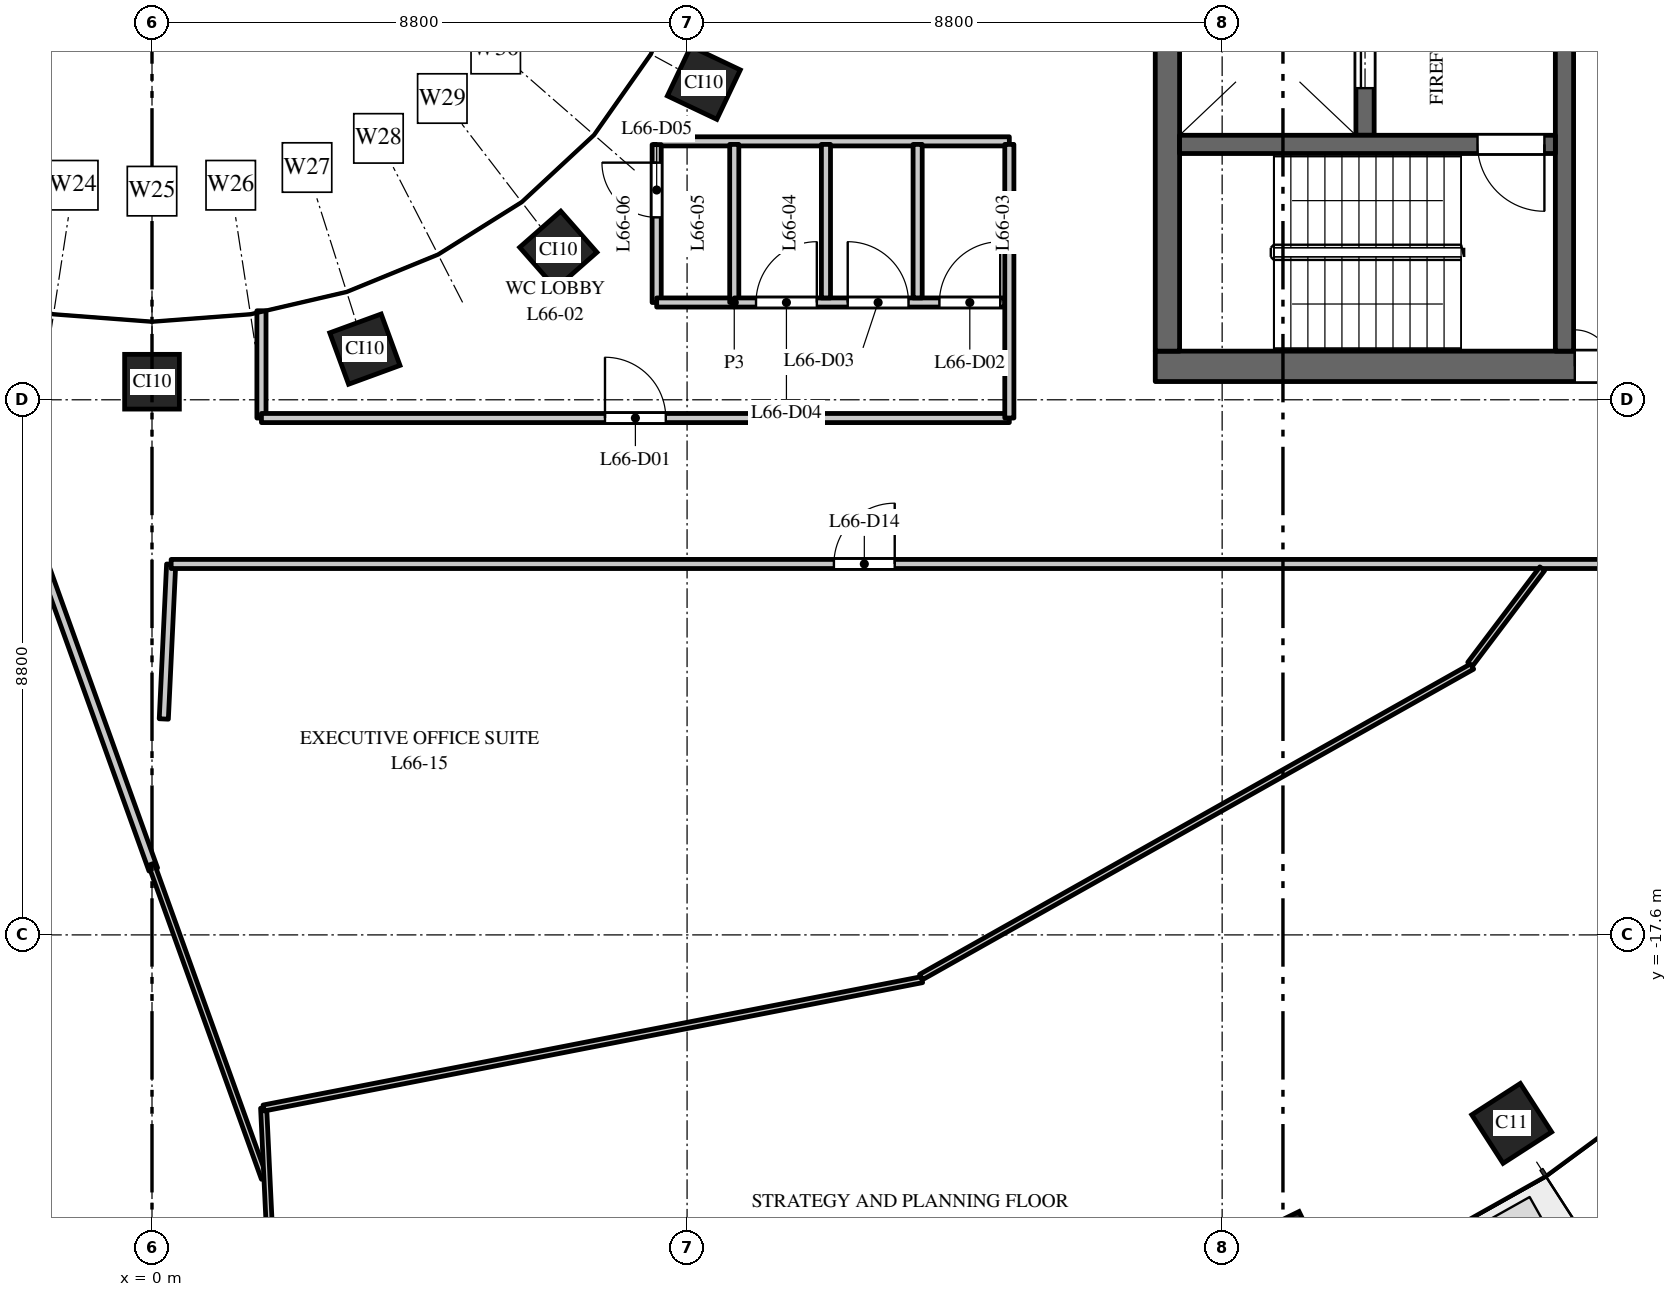
"""IFC4 building model, lengths in metres.
Left out: names, types, materials, properties, quantities, classifications, styles, units other than length and angle.
Written with IfcOpenShell. Run it as: python <this file> out.ifc"""

import sys

from ifc_helpers import new_model, si_unit, direction, frame, frame_2d, origin, origin_2d, place, context, subcontext, project, spatial, rectangle, extrude, element, fill, save


model = new_model("IFC4")
c1 = context("Model", 3, precision=1e-05, world=origin(), true_north=direction((0.0, 1.0)))
c2 = subcontext(c1, "Body", "Model", "MODEL_VIEW")
j1 = project(units=[si_unit("LENGTHUNIT", "METRE"), si_unit("PLANEANGLEUNIT", "RADIAN")], contexts=[c1])
p1 = place(None, origin())
s1 = spatial("IfcSite", under=j1, at=p1, CompositionType="ELEMENT")
p2 = place(p1, origin())
s2 = spatial("IfcBuilding", under=s1, at=p2, CompositionType="ELEMENT")
p3 = place(p2, frame((0.0, 0.0, 307.0)))
s3 = spatial("IfcBuildingStorey", under=s2, at=p3, CompositionType="ELEMENT", Elevation=307.0)
for number, where, z_axis, x_axis in (
    (1, (18.646, -22.785, 0.0), (0.0, 0.0, 1.0), (0.898, 0.439, 0.0)),
    (2, (22.362, -20.7, 0.0), (0.0, 0.0, 1.0), (0.84, 0.542, 0.0)),
):
    element("IfcColumn", number, at=place(p3, frame(where, z_axis=z_axis, x_axis=x_axis)), inside=s3, PredefinedType="COLUMN", context=c2, shape_type="SweptSolid", body=[
        extrude(rectangle(XDim=0.95, YDim=0.95, at=origin_2d()), origin(), (0.0, 0.0, 1.0), 4.0),
    ])
for number, where, z_axis, x_axis in (
    (3, (0.0, -8.503, 0.0), (0.0, 0.0, 1.0), (1.0, 0.0, 0.0)),
    (4, (3.501, -7.967, 0.0), (0.0, 0.0, 1.0), (0.939, 0.344, 0.0)),
    (5, (6.682, -6.334, 0.0), (0.0, 0.0, 1.0), (0.751, 0.66, 0.0)),
    (6, (9.076, -3.588, 0.0), (0.0, 0.0, 1.0), (0.429, 0.903, 0.0)),
):
    element("IfcColumn", number, at=place(p3, frame(where, z_axis=z_axis, x_axis=x_axis)), inside=s3, PredefinedType="COLUMN", context=c2, shape_type="SweptSolid", body=[
        extrude(rectangle(XDim=0.9, YDim=0.9, at=origin_2d()), origin(), (0.0, 0.0, 1.0), 4.0),
    ])
p4 = place(p3, frame((16.5, -8.25, 0.0), z_axis=(0.0, 0.0, 1.0), x_axis=(1.0, 0.0, 0.0)))
e7 = element("IfcWall", 7, at=p4, inside=s3, PredefinedType="SHEAR", context=c2, shape_type="SweptSolid", body=[
    extrude(rectangle(XDim=15.0, YDim=0.5, at=frame_2d((7.5, 0.0))), origin(), (0.0, 0.0, 1.0), 3.7),
])
p5 = place(p4, frame((6.9, 0.0, 0.0)))
e8 = element("IfcOpeningElement", 8, at=p5, cuts=e7, PredefinedType="OPENING", context=c2, shape_type="SweptSolid", body=[
    extrude(rectangle(XDim=1.2, YDim=2.1, at=frame_2d((0.6, 1.05))), frame((0.0, 0.26, 0.0), z_axis=(0.0, -1.0, 0.0), x_axis=(1.0, 0.0, 0.0)), (0.0, 0.0, 1.0), 0.52),
])
p6 = place(p4, frame((12.95, 0.0, 0.0)))
e9 = element("IfcOpeningElement", 9, at=p6, cuts=e7, PredefinedType="OPENING", context=c2, shape_type="SweptSolid", body=[
    extrude(rectangle(XDim=0.9, YDim=2.1, at=frame_2d((0.45, 1.05))), frame((0.0, 0.26, 0.0), z_axis=(0.0, -1.0, 0.0), x_axis=(1.0, 0.0, 0.0)), (0.0, 0.0, 1.0), 0.52),
])
p7 = place(p3, frame((19.95, -4.45, 0.0), z_axis=(0.0, 0.0, 1.0), x_axis=(0.0, 1.0, 0.0)))
e10 = element("IfcWall", 10, at=p7, inside=s3, PredefinedType="SHEAR", context=c2, shape_type="SweptSolid", body=[
    extrude(rectangle(XDim=8.9, YDim=0.3, at=frame_2d((4.45, 0.0))), origin(), (0.0, 0.0, 1.0), 3.7),
])
p8 = place(p7, frame((0.775, 0.0, 0.0)))
e11 = element("IfcOpeningElement", 11, at=p8, cuts=e10, PredefinedType="OPENING", context=c2, shape_type="SweptSolid", body=[
    extrude(rectangle(XDim=1.2, YDim=2.1, at=frame_2d((0.6, 1.05))), frame((0.0, 0.16, 0.0), z_axis=(0.0, -1.0, 0.0), x_axis=(1.0, 0.0, 0.0)), (0.0, 0.0, 1.0), 0.32),
])
p9 = place(p7, frame((6.0, 0.0, 0.0)))
e12 = element("IfcOpeningElement", 12, at=p9, cuts=e10, PredefinedType="OPENING", context=c2, shape_type="SweptSolid", body=[
    extrude(rectangle(XDim=0.9, YDim=2.1, at=frame_2d((0.45, 1.05))), frame((0.0, 0.16, 0.0), z_axis=(0.0, -1.0, 0.0), x_axis=(1.0, 0.0, 0.0)), (0.0, 0.0, 1.0), 0.32),
])
p10 = place(p3, frame((16.7, -8.0, 0.0), z_axis=(0.0, 0.0, 1.0), x_axis=(0.0, 1.0, 0.0)))
e13 = element("IfcWall", 13, at=p10, inside=s3, PredefinedType="SHEAR", context=c2, shape_type="SweptSolid", body=[
    extrude(rectangle(XDim=16.0, YDim=0.4, at=frame_2d((8.0, 0.0))), origin(), (0.0, 0.0, 1.0), 3.7),
])
p11 = place(p3, frame((23.23, -8.0, 0.0), z_axis=(0.0, 0.0, 1.0), x_axis=(0.0, 1.0, 0.0)))
e14 = element("IfcWall", 14, at=p11, inside=s3, PredefinedType="SHEAR", context=c2, shape_type="SweptSolid", body=[
    extrude(rectangle(XDim=7.875, YDim=0.3, at=frame_2d((3.938, 0.0))), origin(), (0.0, 0.0, 1.0), 3.7),
])
p12 = place(p11, frame((5.15, 0.0, 0.0)))
e15 = element("IfcOpeningElement", 15, at=p12, cuts=e14, PredefinedType="OPENING", context=c2, shape_type="SweptSolid", body=[
    extrude(rectangle(XDim=1.1, YDim=2.1, at=frame_2d((0.55, 1.05))), frame((0.0, 0.16, 0.0), z_axis=(0.0, -1.0, 0.0), x_axis=(1.0, 0.0, 0.0)), (0.0, 0.0, 1.0), 0.32),
])
p13 = place(p3, frame((16.9, -4.6, 0.0), z_axis=(0.0, 0.0, 1.0), x_axis=(1.0, 0.0, 0.0)))
e16 = element("IfcWall", 16, at=p13, inside=s3, PredefinedType="SHEAR", context=c2, shape_type="SweptSolid", body=[
    extrude(rectangle(XDim=6.18, YDim=0.3, at=frame_2d((3.09, 0.0))), origin(), (0.0, 0.0, 1.0), 3.7),
])
p14 = place(p13, frame((4.9, 0.0, 0.0)))
e17 = element("IfcOpeningElement", 17, at=p14, cuts=e16, PredefinedType="OPENING", context=c2, shape_type="SweptSolid", body=[
    extrude(rectangle(XDim=1.1, YDim=2.1, at=frame_2d((0.55, 1.05))), frame((0.0, 0.16, 0.0), z_axis=(0.0, -1.0, 0.0), x_axis=(1.0, 0.0, 0.0)), (0.0, 0.0, 1.0), 0.32),
])
p15 = place(p3, frame((-1.757, -11.579, 0.0), z_axis=(0.0, 0.0, 1.0), x_axis=(0.338313142308, -0.941033590124, 0.0)))
e18 = element("IfcWall", 18, at=p15, inside=s3, PredefinedType="PARTITIONING", context=c2, shape_type="SweptSolid", body=[
    extrude(rectangle(XDim=5.256, YDim=0.15, at=frame_2d((2.628, 0.0))), origin(), (0.0, 0.0, 1.0), 2.85),
])
p16 = place(p3, frame((-0.01, -16.438, 0.0), z_axis=(0.0, 0.0, 1.0), x_axis=(0.338376018219, -0.941010983089, 0.0)))
e19 = element("IfcWall", 19, at=p16, inside=s3, PredefinedType="PARTITIONING", context=c2, shape_type="SweptSolid", body=[
    extrude(rectangle(XDim=5.488, YDim=0.1, at=frame_2d((2.744, 0.0))), origin(), (0.0, 0.0, 1.0), 3.7),
])
p17 = place(p3, frame((0.194, -14.049, 0.0), z_axis=(0.0, 0.0, 1.0), x_axis=(0.047428579634, 0.99887463169, 0.0)))
e20 = element("IfcWall", 20, at=p17, inside=s3, PredefinedType="PARTITIONING", context=c2, shape_type="SweptSolid", body=[
    extrude(rectangle(XDim=2.548, YDim=0.15, at=frame_2d((1.274, 0.0))), origin(), (0.0, 0.0, 1.0), 3.7),
])
p18 = place(p3, frame((0.315, -11.5, 0.0), z_axis=(0.0, 0.0, 1.0), x_axis=(1.0, 0.0, 0.0)))
e21 = element("IfcWall", 21, at=p18, inside=s3, PredefinedType="PARTITIONING", context=c2, shape_type="SweptSolid", body=[
    extrude(rectangle(XDim=31.185, YDim=0.15, at=frame_2d((15.593, 0.0))), origin(), (0.0, 0.0, 1.0), 2.75),
])
p19 = place(p18, frame((10.9, 0.0, 0.0)))
e22 = element("IfcOpeningElement", 22, at=p19, cuts=e21, PredefinedType="OPENING", context=c2, shape_type="SweptSolid", body=[
    extrude(rectangle(XDim=1.0, YDim=2.1, at=frame_2d((0.5, 1.05))), frame((0.0, 0.085, 0.0), z_axis=(0.0, -1.0, 0.0), x_axis=(1.0, 0.0, 0.0)), (0.0, 0.0, 1.0), 0.17),
])
p20 = place(p18, frame((26.003, 0.0, 0.0)))
e23 = element("IfcOpeningElement", 23, at=p20, cuts=e21, PredefinedType="OPENING", context=c2, shape_type="SweptSolid", body=[
    extrude(rectangle(XDim=1.0, YDim=2.1, at=frame_2d((0.5, 1.05))), frame((0.0, 0.085, 0.0), z_axis=(0.0, -1.0, 0.0), x_axis=(1.0, 0.0, 0.0)), (0.0, 0.0, 1.0), 0.17),
])
p21 = place(p3, frame((1.8, -9.1, 0.0), z_axis=(0.0, 0.0, 1.0), x_axis=(0.0, 1.0, 0.0)))
e24 = element("IfcWall", 24, at=p21, inside=s3, PredefinedType="PARTITIONING", context=c2, shape_type="SweptSolid", body=[
    extrude(rectangle(XDim=1.764, YDim=0.15, at=frame_2d((0.882, 0.0))), origin(), (0.0, 0.0, 1.0), 3.0),
])
p22 = place(p3, frame((1.8, -9.1, 0.0), z_axis=(0.0, 0.0, 1.0), x_axis=(1.0, 0.0, 0.0)))
e25 = element("IfcWall", 25, at=p22, inside=s3, PredefinedType="PARTITIONING", context=c2, shape_type="SweptSolid", body=[
    extrude(rectangle(XDim=12.3, YDim=0.15, at=frame_2d((6.15, 0.0))), origin(), (0.0, 0.0, 1.0), 2.85),
])
p23 = place(p22, frame((5.65, 0.0, 0.0)))
e26 = element("IfcOpeningElement", 26, at=p23, cuts=e25, PredefinedType="OPENING", context=c2, shape_type="SweptSolid", body=[
    extrude(rectangle(XDim=1.0, YDim=2.1, at=frame_2d((0.5, 1.05))), frame((0.0, 0.085, 0.0), z_axis=(0.0, -1.0, 0.0), x_axis=(1.0, 0.0, 0.0)), (0.0, 0.0, 1.0), 0.17),
])
p24 = place(p3, frame((1.836, -20.448, 0.0), z_axis=(0.0, 0.0, 1.0), x_axis=(0.04746405939, -0.998872946408, 0.0)))
e27 = element("IfcWall", 27, at=p24, inside=s3, PredefinedType="PARTITIONING", context=c2, shape_type="SweptSolid", body=[
    extrude(rectangle(XDim=7.458, YDim=0.1, at=frame_2d((3.729, 0.0))), origin(), (0.0, 0.0, 1.0), 3.0),
])
p25 = place(p3, frame((1.836, -20.447, 0.0), z_axis=(0.0, 0.0, 1.0), x_axis=(0.98151990149, 0.191360087216, 0.0)))
e28 = element("IfcWall", 28, at=p25, inside=s3, PredefinedType="PARTITIONING", context=c2, shape_type="SweptSolid", body=[
    extrude(rectangle(XDim=11.032, YDim=0.1, at=frame_2d((5.516, 0.0))), origin(), (0.0, 0.0, 1.0), 2.85),
])
p26 = place(p3, frame((8.271, -4.55, 0.0), z_axis=(0.0, 0.0, 1.0), x_axis=(1.0, 0.0, 0.0)))
e29 = element("IfcWall", 29, at=p26, inside=s3, PredefinedType="PARTITIONING", context=c2, shape_type="SweptSolid", body=[
    extrude(rectangle(XDim=5.829, YDim=0.15, at=frame_2d((2.915, 0.0))), origin(), (0.0, 0.0, 1.0), 2.75),
])
p27 = place(p3, frame((8.3, -7.2, 0.0), z_axis=(0.0, 0.0, 1.0), x_axis=(0.0, 1.0, 0.0)))
e30 = element("IfcWall", 30, at=p27, inside=s3, PredefinedType="PARTITIONING", context=c2, shape_type="SweptSolid", body=[
    extrude(rectangle(XDim=2.596, YDim=0.15, at=frame_2d((1.298, 0.0))), origin(), (0.0, 0.0, 1.0), 3.7),
])
p28 = place(p27, frame((1.4, 0.0, 0.0)))
e31 = element("IfcOpeningElement", 31, at=p28, cuts=e30, PredefinedType="OPENING", context=c2, shape_type="SweptSolid", body=[
    extrude(rectangle(XDim=0.9, YDim=2.1, at=frame_2d((0.45, 1.05))), frame((0.0, 0.085, 0.0), z_axis=(0.0, -1.0, 0.0), x_axis=(1.0, 0.0, 0.0)), (0.0, 0.0, 1.0), 0.17),
])
p29 = place(p3, frame((8.3, -7.2, 0.0), z_axis=(0.0, 0.0, 1.0), x_axis=(1.0, 0.0, 0.0)))
e32 = element("IfcWall", 32, at=p29, inside=s3, PredefinedType="PARTITIONING", context=c2, shape_type="SweptSolid", body=[
    extrude(rectangle(XDim=1.276, YDim=0.15, at=frame_2d((0.638, 0.0))), origin(), (0.0, 0.0, 1.0), 3.7),
])
p30 = place(p3, frame((9.576, -7.2, 0.0), z_axis=(0.0, 0.0, 1.0), x_axis=(0.0, 1.0, 0.0)))
e33 = element("IfcWall", 33, at=p30, inside=s3, PredefinedType="PARTITIONING", context=c2, shape_type="SweptSolid", body=[
    extrude(rectangle(XDim=2.6, YDim=0.15, at=frame_2d((1.3, 0.0))), origin(), (0.0, 0.0, 1.0), 2.75),
])
p31 = place(p3, frame((9.576, -7.2, 0.0), z_axis=(0.0, 0.0, 1.0), x_axis=(1.0, 0.0, 0.0)))
e34 = element("IfcWall", 34, at=p31, inside=s3, PredefinedType="PARTITIONING", context=c2, shape_type="SweptSolid", body=[
    extrude(rectangle(XDim=4.449, YDim=0.15, at=frame_2d((2.225, 0.0))), origin(), (0.0, 0.0, 1.0), 2.75),
])
p32 = place(p31, frame((3.374, 0.0, 0.0)))
e35 = element("IfcOpeningElement", 35, at=p32, cuts=e34, PredefinedType="OPENING", context=c2, shape_type="SweptSolid", body=[
    extrude(rectangle(XDim=1.0, YDim=2.1, at=frame_2d((0.5, 1.05))), frame((0.0, 0.085, 0.0), z_axis=(0.0, -1.0, 0.0), x_axis=(1.0, 0.0, 0.0)), (0.0, 0.0, 1.0), 0.17),
])
p33 = place(p31, frame((1.866, 0.0, 0.0)))
e36 = element("IfcOpeningElement", 36, at=p33, cuts=e34, PredefinedType="OPENING", context=c2, shape_type="SweptSolid", body=[
    extrude(rectangle(XDim=1.0, YDim=2.1, at=frame_2d((0.5, 1.05))), frame((0.0, 0.085, 0.0), z_axis=(0.0, -1.0, 0.0), x_axis=(1.0, 0.0, 0.0)), (0.0, 0.0, 1.0), 0.17),
])
p34 = place(p31, frame((0.358, 0.0, 0.0)))
e37 = element("IfcOpeningElement", 37, at=p34, cuts=e34, PredefinedType="OPENING", context=c2, shape_type="SweptSolid", body=[
    extrude(rectangle(XDim=1.0, YDim=2.1, at=frame_2d((0.5, 1.05))), frame((0.0, 0.085, 0.0), z_axis=(0.0, -1.0, 0.0), x_axis=(1.0, 0.0, 0.0)), (0.0, 0.0, 1.0), 0.17),
])
p35 = place(p3, frame((11.084, -7.125, 0.0), z_axis=(0.0, 0.0, 1.0), x_axis=(0.0, 1.0, 0.0)))
e38 = element("IfcWall", 38, at=p35, inside=s3, PredefinedType="PARTITIONING", context=c2, shape_type="SweptSolid", body=[
    extrude(rectangle(XDim=2.525, YDim=0.15, at=frame_2d((1.262, 0.0))), origin(), (0.0, 0.0, 1.0), 2.75),
])
p36 = place(p3, frame((12.648, -18.293, 0.0), z_axis=(0.0, 0.0, 1.0), x_axis=(0.871228121457, 0.490878355994, 0.0)))
e39 = element("IfcWall", 39, at=p36, inside=s3, PredefinedType="PARTITIONING", context=c2, shape_type="SweptSolid", body=[
    extrude(rectangle(XDim=10.404, YDim=0.1, at=frame_2d((5.202, 0.0))), origin(), (0.0, 0.0, 1.0), 3.7),
])
p37 = place(p3, frame((12.592, -7.125, 0.0), z_axis=(0.0, 0.0, 1.0), x_axis=(0.0, 1.0, 0.0)))
e40 = element("IfcWall", 40, at=p37, inside=s3, PredefinedType="PARTITIONING", context=c2, shape_type="SweptSolid", body=[
    extrude(rectangle(XDim=2.525, YDim=0.15, at=frame_2d((1.262, 0.0))), origin(), (0.0, 0.0, 1.0), 2.75),
])
p38 = place(p3, frame((14.1, -9.1, 0.0), z_axis=(0.0, 0.0, 1.0), x_axis=(0.0, 1.0, 0.0)))
e41 = element("IfcWall", 41, at=p38, inside=s3, PredefinedType="PARTITIONING", context=c2, shape_type="SweptSolid", body=[
    extrude(rectangle(XDim=4.5, YDim=0.15, at=frame_2d((2.25, 0.0))), origin(), (0.0, 0.0, 1.0), 2.75),
])
p39 = place(p3, frame((21.679, -13.148, 0.0), z_axis=(0.0, 0.0, 1.0), x_axis=(0.602755856466, 0.797925671661, 0.0)))
e42 = element("IfcWall", 42, at=p39, inside=s3, PredefinedType="PARTITIONING", context=c2, shape_type="SweptSolid", body=[
    extrude(rectangle(XDim=1.968, YDim=0.1, at=frame_2d((0.984, 0.0))), origin(), (0.0, 0.0, 1.0), 2.75),
])
p40 = place(p8, origin())
e43 = element("IfcDoor", 43, at=p40, inside=s3, OperationType="DOUBLE_DOOR_SLIDING", PredefinedType="DOOR", context=c2, shape_type="SweptSolid", body=[
    extrude(rectangle(XDim=1.2, YDim=2.1, at=frame_2d((0.6, 1.05))), frame((0.0, 0.025, 0.0), z_axis=(0.0, -1.0, 0.0), x_axis=(1.0, 0.0, 0.0)), (0.0, 0.0, 1.0), 0.05),
])
fill(e11, e43)
p41 = place(p14, origin())
e44 = element("IfcDoor", 44, at=p41, inside=s3, OperationType="SINGLE_SWING_RIGHT", PredefinedType="DOOR", context=c2, shape_type="SweptSolid", body=[
    extrude(rectangle(XDim=1.1, YDim=2.1, at=frame_2d((0.55, 1.05))), frame((0.0, 0.025, 0.0), z_axis=(0.0, -1.0, 0.0), x_axis=(1.0, 0.0, 0.0)), (0.0, 0.0, 1.0), 0.05),
])
fill(e17, e44)
p42 = place(p5, origin())
e45 = element("IfcDoor", 45, at=p42, inside=s3, OperationType="DOUBLE_DOOR_DOUBLE_SWING", PredefinedType="DOOR", context=c2, shape_type="SweptSolid", body=[
    extrude(rectangle(XDim=1.2, YDim=2.1, at=frame_2d((0.6, 1.05))), frame((0.0, 0.025, 0.0), z_axis=(0.0, -1.0, 0.0), x_axis=(1.0, 0.0, 0.0)), (0.0, 0.0, 1.0), 0.05),
])
fill(e8, e45)
p43 = place(p23, origin())
e46 = element("IfcDoor", 46, at=p43, inside=s3, OperationType="SINGLE_SWING_LEFT", PredefinedType="DOOR", context=c2, shape_type="SweptSolid", body=[
    extrude(rectangle(XDim=1.0, YDim=2.1, at=frame_2d((0.5, 1.05))), frame((0.0, 0.025, 0.0), z_axis=(0.0, -1.0, 0.0), x_axis=(1.0, 0.0, 0.0)), (0.0, 0.0, 1.0), 0.05),
])
fill(e26, e46)
p44 = place(p32, origin())
e47 = element("IfcDoor", 47, at=p44, inside=s3, OperationType="SINGLE_SWING_RIGHT", PredefinedType="DOOR", context=c2, shape_type="SweptSolid", body=[
    extrude(rectangle(XDim=1.0, YDim=2.1, at=frame_2d((0.5, 1.05))), frame((0.0, 0.025, 0.0), z_axis=(0.0, -1.0, 0.0), x_axis=(1.0, 0.0, 0.0)), (0.0, 0.0, 1.0), 0.05),
])
fill(e35, e47)
p45 = place(p33, origin())
e48 = element("IfcDoor", 48, at=p45, inside=s3, OperationType="SINGLE_SWING_LEFT", PredefinedType="DOOR", context=c2, shape_type="SweptSolid", body=[
    extrude(rectangle(XDim=1.0, YDim=2.1, at=frame_2d((0.5, 1.05))), frame((0.0, 0.025, 0.0), z_axis=(0.0, -1.0, 0.0), x_axis=(1.0, 0.0, 0.0)), (0.0, 0.0, 1.0), 0.05),
])
fill(e36, e48)
p46 = place(p34, origin())
e49 = element("IfcDoor", 49, at=p46, inside=s3, OperationType="SINGLE_SWING_RIGHT", PredefinedType="DOOR", context=c2, shape_type="SweptSolid", body=[
    extrude(rectangle(XDim=1.0, YDim=2.1, at=frame_2d((0.5, 1.05))), frame((0.0, 0.025, 0.0), z_axis=(0.0, -1.0, 0.0), x_axis=(1.0, 0.0, 0.0)), (0.0, 0.0, 1.0), 0.05),
])
fill(e37, e49)
p47 = place(p28, origin())
e50 = element("IfcDoor", 50, at=p47, inside=s3, OperationType="SINGLE_SWING_RIGHT", PredefinedType="DOOR", context=c2, shape_type="SweptSolid", body=[
    extrude(rectangle(XDim=0.9, YDim=2.1, at=frame_2d((0.45, 1.05))), frame((0.0, 0.025, 0.0), z_axis=(0.0, -1.0, 0.0), x_axis=(1.0, 0.0, 0.0)), (0.0, 0.0, 1.0), 0.05),
])
fill(e31, e50)
p48 = place(p19, origin())
e51 = element("IfcDoor", 51, at=p48, inside=s3, OperationType="SINGLE_SWING_RIGHT", PredefinedType="DOOR", context=c2, shape_type="SweptSolid", body=[
    extrude(rectangle(XDim=1.0, YDim=2.1, at=frame_2d((0.5, 1.05))), frame((0.0, 0.025, 0.0), z_axis=(0.0, -1.0, 0.0), x_axis=(1.0, 0.0, 0.0)), (0.0, 0.0, 1.0), 0.05),
])
fill(e22, e51)
save(model, sys.argv[1])
